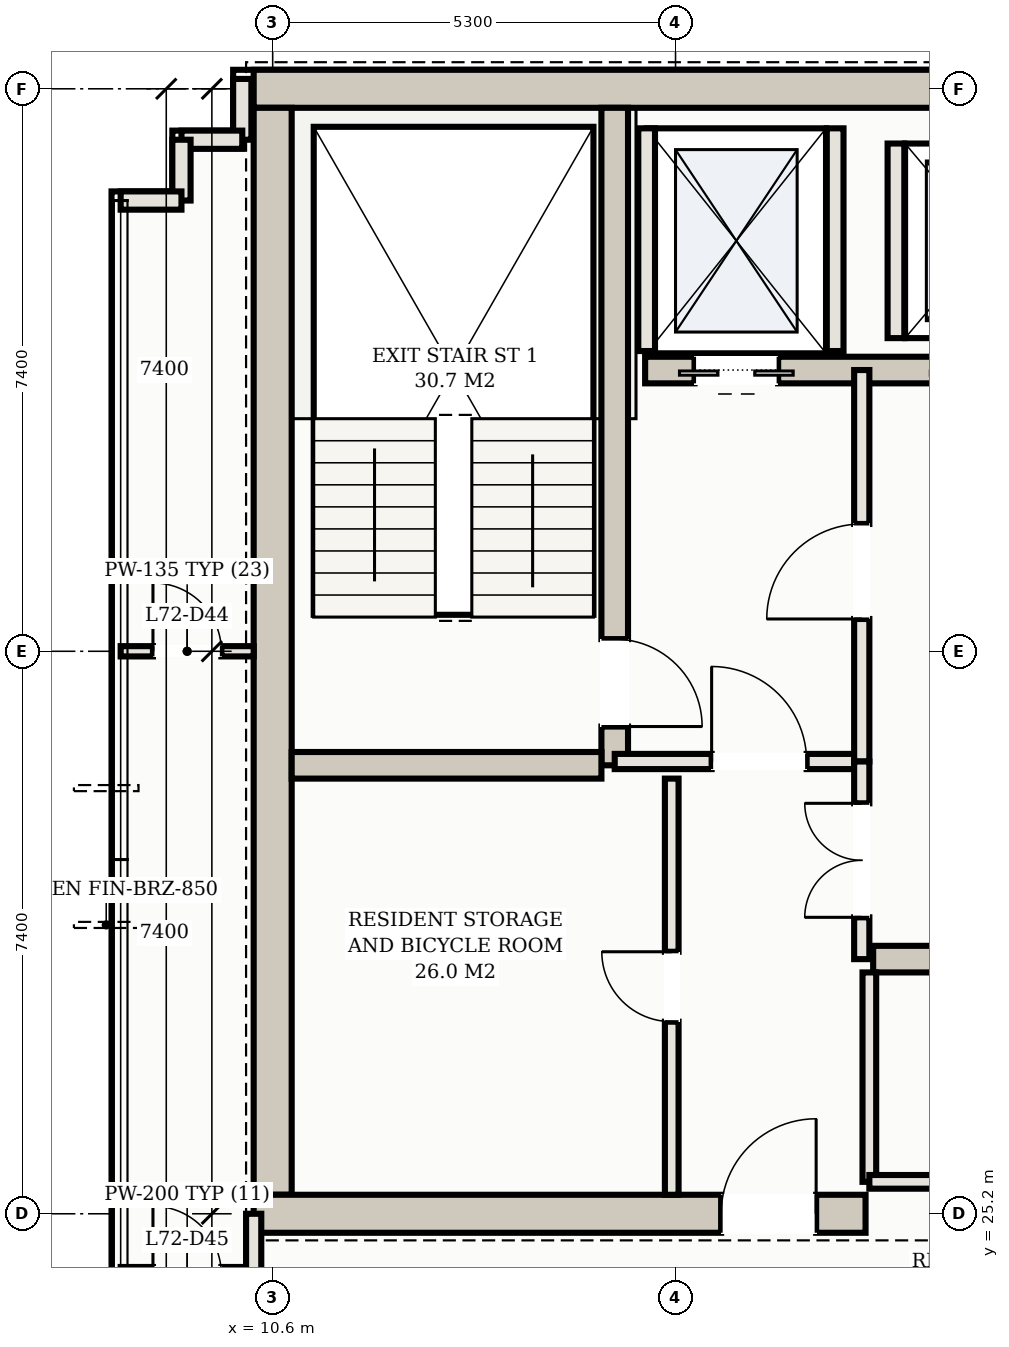
"""IFC4 building model, lengths in metres.
Left out: names, types, materials, properties, quantities, classifications, styles, units other than length and angle.
Written with IfcOpenShell. Run it as: python <this file> out.ifc"""

import sys

from ifc_helpers import new_model, si_unit, direction, frame, frame_2d, origin, place, context, subcontext, project, spatial, rectangle, extrude, element, fill, save


model = new_model("IFC4")
c1 = context("Model", 3, precision=1e-05, world=origin(), true_north=direction((0.0, 1.0)))
c2 = subcontext(c1, "Body", "Model", "MODEL_VIEW")
j1 = project(units=[si_unit("LENGTHUNIT", "METRE"), si_unit("PLANEANGLEUNIT", "RADIAN")], contexts=[c1])
p1 = place(None, origin())
s1 = spatial("IfcSite", under=j1, at=p1, CompositionType="ELEMENT")
p2 = place(p1, origin())
s2 = spatial("IfcBuilding", under=s1, at=p2, CompositionType="ELEMENT")
p3 = place(p2, frame((0.0, 0.0, 259.4)))
s3 = spatial("IfcBuildingStorey", under=s2, at=p3, CompositionType="ELEMENT", Elevation=259.4)
p4 = place(p3, frame((10.35, 40.0, 0.0), z_axis=(0.0, 0.0, 1.0), x_axis=(1.0, 0.0, 0.0)))
e1 = element("IfcWall", 1, at=p4, inside=s3, PredefinedType="SHEAR", context=c2, shape_type="SweptSolid", body=[
    extrude(rectangle(XDim=32.3, YDim=0.5, at=frame_2d((16.15, 0.0))), origin(), (0.0, 0.0, 1.0), 3.11),
])
p5 = place(p3, frame((10.6, 25.45, 0.0), z_axis=(0.0, 0.0, 1.0), x_axis=(0.0, 1.0, 0.0)))
e2 = element("IfcWall", 2, at=p5, inside=s3, PredefinedType="SHEAR", context=c2, shape_type="SweptSolid", body=[
    extrude(rectangle(XDim=14.3, YDim=0.5, at=frame_2d((7.15, 0.0))), origin(), (0.0, 0.0, 1.0), 3.11),
])
p6 = place(p3, frame((10.35, 25.2, 0.0), z_axis=(0.0, 0.0, 1.0), x_axis=(1.0, 0.0, 0.0)))
e3 = element("IfcWall", 3, at=p6, inside=s3, PredefinedType="SHEAR", context=c2, shape_type="SweptSolid", body=[
    extrude(rectangle(XDim=8.05, YDim=0.5, at=frame_2d((4.025, 0.0))), origin(), (0.0, 0.0, 1.0), 3.11),
])
p7 = place(p6, frame((6.15, 0.0, 0.0)))
e4 = element("IfcOpeningElement", 4, at=p7, cuts=e3, PredefinedType="OPENING", context=c2, shape_type="SweptSolid", body=[
    extrude(rectangle(XDim=1.25, YDim=2.2, at=frame_2d((0.625, 1.1))), frame((0.0, 0.26, 0.0), z_axis=(0.0, -1.0, 0.0), x_axis=(1.0, 0.0, 0.0)), (0.0, 0.0, 1.0), 0.52),
])
p8 = place(p3, frame((15.1, 31.1, 0.0), z_axis=(0.0, 0.0, 1.0), x_axis=(0.0, 1.0, 0.0)))
e5 = element("IfcWall", 5, at=p8, inside=s3, PredefinedType="SHEAR", context=c2, shape_type="SweptSolid", body=[
    extrude(rectangle(XDim=8.65, YDim=0.35, at=frame_2d((4.325, 0.0))), origin(), (0.0, 0.0, 1.0), 3.11),
])
p9 = place(p8, frame((0.51, 0.0, 0.0)))
e6 = element("IfcOpeningElement", 6, at=p9, cuts=e5, PredefinedType="OPENING", context=c2, shape_type="SweptSolid", body=[
    extrude(rectangle(XDim=1.15, YDim=2.2, at=frame_2d((0.575, 1.1))), frame((0.0, 0.185, 0.0), z_axis=(0.0, -1.0, 0.0), x_axis=(1.0, 0.0, 0.0)), (0.0, 0.0, 1.0), 0.37),
])
p10 = place(p3, frame((10.85, 31.1, 0.0), z_axis=(0.0, 0.0, 1.0), x_axis=(1.0, 0.0, 0.0)))
e7 = element("IfcWall", 7, at=p10, inside=s3, PredefinedType="SHEAR", context=c2, shape_type="SweptSolid", body=[
    extrude(rectangle(XDim=4.075, YDim=0.35, at=frame_2d((2.038, 0.0))), origin(), (0.0, 0.0, 1.0), 3.11),
])
p11 = place(p3, frame((15.5, 36.3, 0.0), z_axis=(0.0, 0.0, 1.0), x_axis=(1.0, 0.0, 0.0)))
e8 = element("IfcWall", 8, at=p11, inside=s3, PredefinedType="SHEAR", context=c2, shape_type="SweptSolid", body=[
    extrude(rectangle(XDim=22.0, YDim=0.35, at=frame_2d((11.0, 0.0))), origin(), (0.0, 0.0, 1.0), 3.11),
])
p12 = place(p11, frame((0.65, 0.0, 0.0)))
e9 = element("IfcOpeningElement", 9, at=p12, cuts=e8, PredefinedType="OPENING", context=c2, shape_type="SweptSolid", body=[
    extrude(rectangle(XDim=1.1, YDim=2.15, at=frame_2d((0.55, 1.075))), frame((0.0, 0.185, 0.0), z_axis=(0.0, -1.0, 0.0), x_axis=(1.0, 0.0, 0.0)), (0.0, 0.0, 1.0), 0.37),
])
p13 = place(p11, frame((20.25, 0.0, 0.0)))
e10 = element("IfcOpeningElement", 10, at=p13, cuts=e8, PredefinedType="OPENING", context=c2, shape_type="SweptSolid", body=[
    extrude(rectangle(XDim=1.1, YDim=2.15, at=frame_2d((0.55, 1.075))), frame((0.0, 0.185, 0.0), z_axis=(0.0, -1.0, 0.0), x_axis=(1.0, 0.0, 0.0)), (0.0, 0.0, 1.0), 0.37),
])
p14 = place(p11, frame((17.05, 0.0, 0.0)))
e11 = element("IfcOpeningElement", 11, at=p14, cuts=e8, PredefinedType="OPENING", context=c2, shape_type="SweptSolid", body=[
    extrude(rectangle(XDim=1.3, YDim=2.2, at=frame_2d((0.65, 1.1))), frame((0.0, 0.185, 0.0), z_axis=(0.0, -1.0, 0.0), x_axis=(1.0, 0.0, 0.0)), (0.0, 0.0, 1.0), 0.37),
])
p15 = place(p11, frame((3.95, 0.0, 0.0)))
e12 = element("IfcOpeningElement", 12, at=p15, cuts=e8, PredefinedType="OPENING", context=c2, shape_type="SweptSolid", body=[
    extrude(rectangle(XDim=1.1, YDim=2.15, at=frame_2d((0.55, 1.075))), frame((0.0, 0.185, 0.0), z_axis=(0.0, -1.0, 0.0), x_axis=(1.0, 0.0, 0.0)), (0.0, 0.0, 1.0), 0.37),
])
p16 = place(p11, frame((6.55, 0.0, 0.0)))
e13 = element("IfcOpeningElement", 13, at=p16, cuts=e8, PredefinedType="OPENING", context=c2, shape_type="SweptSolid", body=[
    extrude(rectangle(XDim=1.1, YDim=2.15, at=frame_2d((0.55, 1.075))), frame((0.0, 0.185, 0.0), z_axis=(0.0, -1.0, 0.0), x_axis=(1.0, 0.0, 0.0)), (0.0, 0.0, 1.0), 0.37),
])
p17 = place(p11, frame((9.15, 0.0, 0.0)))
e14 = element("IfcOpeningElement", 14, at=p17, cuts=e8, PredefinedType="OPENING", context=c2, shape_type="SweptSolid", body=[
    extrude(rectangle(XDim=1.1, YDim=2.15, at=frame_2d((0.55, 1.075))), frame((0.0, 0.185, 0.0), z_axis=(0.0, -1.0, 0.0), x_axis=(1.0, 0.0, 0.0)), (0.0, 0.0, 1.0), 0.37),
])
p18 = place(p3, frame((18.5, 28.55, 0.0), z_axis=(0.0, 0.0, 1.0), x_axis=(1.0, 0.0, 0.0)))
e15 = element("IfcWall", 15, at=p18, inside=s3, PredefinedType="SHEAR", context=c2, shape_type="SweptSolid", body=[
    extrude(rectangle(XDim=16.0, YDim=0.35, at=frame_2d((8.0, 0.0))), origin(), (0.0, 0.0, 1.0), 3.11),
])
for number, where, z_axis, x_axis in (
    (16, (15.52, 36.55, 0.0), (0.0, 0.0, 1.0), (0.0, 1.0, 0.0)),
    (17, (18.0, 36.55, 0.0), (0.0, 0.0, 1.0), (0.0, 1.0, 0.0)),
):
    element("IfcWall", number, at=place(p3, frame(where, z_axis=z_axis, x_axis=x_axis)), inside=s3, PredefinedType="SOLIDWALL", context=c2, shape_type="SweptSolid", body=[
        extrude(rectangle(XDim=2.93, YDim=0.22, at=frame_2d((1.465, 0.0))), origin(), (0.0, 0.0, 1.0), 3.11),
    ])
p19 = place(p3, frame((18.8, 36.72, 0.0), z_axis=(0.0, 0.0, 1.0), x_axis=(0.0, 1.0, 0.0)))
e18 = element("IfcWall", 18, at=p19, inside=s3, PredefinedType="SOLIDWALL", context=c2, shape_type="SweptSolid", body=[
    extrude(rectangle(XDim=2.56, YDim=0.22, at=frame_2d((1.28, 0.0))), origin(), (0.0, 0.0, 1.0), 3.11),
])
p20 = place(p3, frame((10.2, 40.13, 0.0), z_axis=(0.0, 0.0, 1.0), x_axis=(0.0, -1.0, 0.0)))
e19 = element("IfcWall", 19, at=p20, inside=s3, PredefinedType="SOLIDWALL", context=c2, shape_type="SweptSolid", body=[
    extrude(rectangle(XDim=0.8, YDim=0.24, at=frame_2d((0.4, 0.0))), origin(), (0.0, 0.0, 1.0), 3.11),
])
for number, where, z_axis, x_axis in (
    (20, (10.2, 39.33, 0.0), (0.0, 0.0, 1.0), (-1.0, 0.0, 0.0)),
    (21, (9.4, 39.33, 0.0), (0.0, 0.0, 1.0), (0.0, -1.0, 0.0)),
):
    element("IfcWall", number, at=place(p3, frame(where, z_axis=z_axis, x_axis=x_axis)), inside=s3, PredefinedType="SOLIDWALL", context=c2, shape_type="SweptSolid", body=[
        extrude(rectangle(XDim=0.8, YDim=0.24, at=frame_2d((0.4, 0.0))), origin(), (0.0, 0.0, 1.0), 3.11),
    ])
p21 = place(p3, frame((9.4, 38.53, 0.0), z_axis=(0.0, 0.0, 1.0), x_axis=(-1.0, 0.0, 0.0)))
e22 = element("IfcWall", 22, at=p21, inside=s3, PredefinedType="SOLIDWALL", context=c2, shape_type="SweptSolid", body=[
    extrude(rectangle(XDim=0.8, YDim=0.24, at=frame_2d((0.4, 0.0))), origin(), (0.0, 0.0, 1.0), 3.11),
])
p22 = place(p3, frame((15.1, 31.15, 0.0), z_axis=(0.0, 0.0, 1.0), x_axis=(1.0, 0.0, 0.0)))
e23 = element("IfcWall", 23, at=p22, inside=s3, PredefinedType="PARTITIONING", context=c2, shape_type="SweptSolid", body=[
    extrude(rectangle(XDim=3.25, YDim=0.2, at=frame_2d((1.625, 0.0))), origin(), (0.0, 0.0, 1.0), 2.45),
])
p23 = place(p22, frame((1.275, 0.0, 0.0)))
e24 = element("IfcOpeningElement", 24, at=p23, cuts=e23, PredefinedType="OPENING", context=c2, shape_type="SweptSolid", body=[
    extrude(rectangle(XDim=1.25, YDim=2.2, at=frame_2d((0.625, 1.1))), frame((0.0, 0.11, 0.0), z_axis=(0.0, -1.0, 0.0), x_axis=(1.0, 0.0, 0.0)), (0.0, 0.0, 1.0), 0.22),
])
p24 = place(p3, frame((18.35, 31.15, 0.0), z_axis=(0.0, 0.0, 1.0), x_axis=(0.0, 1.0, 0.0)))
e25 = element("IfcWall", 25, at=p24, inside=s3, PredefinedType="PARTITIONING", context=c2, shape_type="SweptSolid", body=[
    extrude(rectangle(XDim=5.15, YDim=0.2, at=frame_2d((2.575, 0.0))), origin(), (0.0, 0.0, 1.0), 2.45),
])
p25 = place(p24, frame((1.875, 0.0, 0.0)))
e26 = element("IfcOpeningElement", 26, at=p25, cuts=e25, PredefinedType="OPENING", context=c2, shape_type="SweptSolid", body=[
    extrude(rectangle(XDim=1.25, YDim=2.2, at=frame_2d((0.625, 1.1))), frame((0.0, 0.11, 0.0), z_axis=(0.0, -1.0, 0.0), x_axis=(1.0, 0.0, 0.0)), (0.0, 0.0, 1.0), 0.22),
])
p26 = place(p3, frame((15.85, 25.45, 0.0), z_axis=(0.0, 0.0, 1.0), x_axis=(0.0, 1.0, 0.0)))
e27 = element("IfcWall", 27, at=p26, inside=s3, PredefinedType="PARTITIONING", context=c2, shape_type="SweptSolid", body=[
    extrude(rectangle(XDim=5.475, YDim=0.18, at=frame_2d((2.738, 0.0))), origin(), (0.0, 0.0, 1.0), 2.45),
])
p27 = place(p26, frame((2.277, 0.0, 0.0)))
e28 = element("IfcOpeningElement", 28, at=p27, cuts=e27, PredefinedType="OPENING", context=c2, shape_type="SweptSolid", body=[
    extrude(rectangle(XDim=0.92, YDim=2.15, at=frame_2d((0.46, 1.075))), frame((0.0, 0.1, 0.0), z_axis=(0.0, -1.0, 0.0), x_axis=(1.0, 0.0, 0.0)), (0.0, 0.0, 1.0), 0.2),
])
p28 = place(p3, frame((18.35, 28.55, 0.0), z_axis=(0.0, 0.0, 1.0), x_axis=(0.0, 1.0, 0.0)))
e29 = element("IfcWall", 29, at=p28, inside=s3, PredefinedType="PARTITIONING", context=c2, shape_type="SweptSolid", body=[
    extrude(rectangle(XDim=2.6, YDim=0.2, at=frame_2d((1.3, 0.0))), origin(), (0.0, 0.0, 1.0), 2.45),
])
p29 = place(p28, frame((0.55, 0.0, 0.0)))
e30 = element("IfcOpeningElement", 30, at=p29, cuts=e29, PredefinedType="OPENING", context=c2, shape_type="SweptSolid", body=[
    extrude(rectangle(XDim=1.5, YDim=2.25, at=frame_2d((0.75, 1.125))), frame((0.0, 0.11, 0.0), z_axis=(0.0, -1.0, 0.0), x_axis=(1.0, 0.0, 0.0)), (0.0, 0.0, 1.0), 0.22),
])
p30 = place(p3, frame((18.45, 25.62, 0.0), z_axis=(0.0, 0.0, 1.0), x_axis=(0.0, 1.0, 0.0)))
e31 = element("IfcWall", 31, at=p30, inside=s3, PredefinedType="PARTITIONING", context=c2, shape_type="SweptSolid", body=[
    extrude(rectangle(XDim=2.755, YDim=0.18, at=frame_2d((1.377, 0.0))), origin(), (0.0, 0.0, 1.0), 2.45),
])
p31 = place(p3, frame((18.45, 25.62, 0.0), z_axis=(0.0, 0.0, 1.0), x_axis=(1.0, 0.0, 0.0)))
e32 = element("IfcWall", 32, at=p31, inside=s3, PredefinedType="PARTITIONING", context=c2, shape_type="SweptSolid", body=[
    extrude(rectangle(XDim=7.9, YDim=0.18, at=frame_2d((3.95, 0.0))), origin(), (0.0, 0.0, 1.0), 2.45),
])
p32 = place(p31, frame((3.34, 0.0, 0.0)))
e33 = element("IfcOpeningElement", 33, at=p32, cuts=e32, PredefinedType="OPENING", context=c2, shape_type="SweptSolid", body=[
    extrude(rectangle(XDim=0.92, YDim=2.15, at=frame_2d((0.46, 1.075))), frame((0.0, 0.1, 0.0), z_axis=(0.0, -1.0, 0.0), x_axis=(1.0, 0.0, 0.0)), (0.0, 0.0, 1.0), 0.2),
])
p33 = place(p3, frame((8.6, 24.4, 0.0), z_axis=(0.0, 0.0, 1.0), x_axis=(1.0, 0.0, 0.0)))
e34 = element("IfcWall", 34, at=p33, inside=s3, PredefinedType="PARTITIONING", context=c2, shape_type="SweptSolid", body=[
    extrude(rectangle(XDim=1.75, YDim=0.2, at=frame_2d((0.875, 0.0))), origin(), (0.0, 0.0, 1.0), 2.45),
])
p34 = place(p33, frame((0.425, 0.0, 0.0)))
e35 = element("IfcOpeningElement", 35, at=p34, cuts=e34, PredefinedType="OPENING", context=c2, shape_type="SweptSolid", body=[
    extrude(rectangle(XDim=0.9, YDim=2.15, at=frame_2d((0.45, 1.075))), frame((0.0, 0.11, 0.0), z_axis=(0.0, -1.0, 0.0), x_axis=(1.0, 0.0, 0.0)), (0.0, 0.0, 1.0), 0.22),
])
p35 = place(p3, frame((10.35, 24.4, 0.0), z_axis=(0.0, 0.0, 1.0), x_axis=(0.0, 1.0, 0.0)))
e36 = element("IfcWall", 36, at=p35, inside=s3, PredefinedType="PARTITIONING", context=c2, shape_type="SweptSolid", body=[
    extrude(rectangle(XDim=0.8, YDim=0.2, at=frame_2d((0.4, 0.0))), origin(), (0.0, 0.0, 1.0), 2.45),
])
p36 = place(p3, frame((8.6, 32.6, 0.0), z_axis=(0.0, 0.0, 1.0), x_axis=(1.0, 0.0, 0.0)))
e37 = element("IfcWall", 37, at=p36, inside=s3, PredefinedType="PARTITIONING", context=c2, shape_type="SweptSolid", body=[
    extrude(rectangle(XDim=1.75, YDim=0.135, at=frame_2d((0.875, 0.0))), origin(), (0.0, 0.0, 1.0), 2.45),
])
p37 = place(p36, frame((0.425, 0.0, 0.0)))
e38 = element("IfcOpeningElement", 38, at=p37, cuts=e37, PredefinedType="OPENING", context=c2, shape_type="SweptSolid", body=[
    extrude(rectangle(XDim=0.9, YDim=2.15, at=frame_2d((0.45, 1.075))), frame((0.0, 0.078, 0.0), z_axis=(0.0, -1.0, 0.0), x_axis=(1.0, 0.0, 0.0)), (0.0, 0.0, 1.0), 0.155),
])
p38 = place(p12, frame((1.1, 0.0, 0.0), z_axis=(0.0, 0.0, 1.0), x_axis=(-1.0, 0.0, 0.0)))
e39 = element("IfcDoor", 39, at=p38, inside=s3, OperationType="DOUBLE_DOOR_SLIDING", PredefinedType="DOOR", context=c2, shape_type="SweptSolid", body=[
    extrude(rectangle(XDim=1.1, YDim=2.15, at=frame_2d((0.55, 1.075))), frame((0.0, 0.025, 0.0), z_axis=(0.0, -1.0, 0.0), x_axis=(1.0, 0.0, 0.0)), (0.0, 0.0, 1.0), 0.05),
])
fill(e9, e39)
p39 = place(p7, origin())
e40 = element("IfcDoor", 40, at=p39, inside=s3, OperationType="SINGLE_SWING_RIGHT", PredefinedType="DOOR", context=c2, shape_type="SweptSolid", body=[
    extrude(rectangle(XDim=1.25, YDim=2.2, at=frame_2d((0.625, 1.1))), frame((0.0, 0.025, 0.0), z_axis=(0.0, -1.0, 0.0), x_axis=(1.0, 0.0, 0.0)), (0.0, 0.0, 1.0), 0.05),
])
fill(e4, e40)
p40 = place(p23, origin())
e41 = element("IfcDoor", 41, at=p40, inside=s3, OperationType="SINGLE_SWING_LEFT", PredefinedType="DOOR", context=c2, shape_type="SweptSolid", body=[
    extrude(rectangle(XDim=1.25, YDim=2.2, at=frame_2d((0.625, 1.1))), frame((0.0, 0.025, 0.0), z_axis=(0.0, -1.0, 0.0), x_axis=(1.0, 0.0, 0.0)), (0.0, 0.0, 1.0), 0.05),
])
fill(e24, e41)
p41 = place(p25, origin())
e42 = element("IfcDoor", 42, at=p41, inside=s3, OperationType="SINGLE_SWING_LEFT", PredefinedType="DOOR", context=c2, shape_type="SweptSolid", body=[
    extrude(rectangle(XDim=1.25, YDim=2.2, at=frame_2d((0.625, 1.1))), frame((0.0, 0.025, 0.0), z_axis=(0.0, -1.0, 0.0), x_axis=(1.0, 0.0, 0.0)), (0.0, 0.0, 1.0), 0.05),
])
fill(e26, e42)
p42 = place(p9, frame((1.15, 0.0, 0.0), z_axis=(0.0, 0.0, 1.0), x_axis=(-1.0, 0.0, 0.0)))
e43 = element("IfcDoor", 43, at=p42, inside=s3, OperationType="SINGLE_SWING_RIGHT", PredefinedType="DOOR", context=c2, shape_type="SweptSolid", body=[
    extrude(rectangle(XDim=1.15, YDim=2.2, at=frame_2d((0.575, 1.1))), frame((0.0, 0.025, 0.0), z_axis=(0.0, -1.0, 0.0), x_axis=(1.0, 0.0, 0.0)), (0.0, 0.0, 1.0), 0.05),
])
fill(e6, e43)
p43 = place(p27, origin())
e44 = element("IfcDoor", 44, at=p43, inside=s3, OperationType="SINGLE_SWING_RIGHT", PredefinedType="DOOR", context=c2, shape_type="SweptSolid", body=[
    extrude(rectangle(XDim=0.92, YDim=2.15, at=frame_2d((0.46, 1.075))), frame((0.0, 0.025, 0.0), z_axis=(0.0, -1.0, 0.0), x_axis=(1.0, 0.0, 0.0)), (0.0, 0.0, 1.0), 0.05),
])
fill(e28, e44)
p44 = place(p29, origin())
e45 = element("IfcDoor", 45, at=p44, inside=s3, OperationType="DOUBLE_DOOR_SINGLE_SWING", PredefinedType="DOOR", context=c2, shape_type="SweptSolid", body=[
    extrude(rectangle(XDim=1.5, YDim=2.25, at=frame_2d((0.75, 1.125))), frame((0.0, 0.025, 0.0), z_axis=(0.0, -1.0, 0.0), x_axis=(1.0, 0.0, 0.0)), (0.0, 0.0, 1.0), 0.05),
])
fill(e30, e45)
p45 = place(p37, origin())
e46 = element("IfcDoor", 46, at=p45, inside=s3, OperationType="SINGLE_SWING_LEFT", PredefinedType="DOOR", context=c2, shape_type="SweptSolid", body=[
    extrude(rectangle(XDim=0.9, YDim=2.15, at=frame_2d((0.45, 1.075))), frame((0.0, 0.025, 0.0), z_axis=(0.0, -1.0, 0.0), x_axis=(1.0, 0.0, 0.0)), (0.0, 0.0, 1.0), 0.05),
])
fill(e38, e46)
save(model, sys.argv[1])
